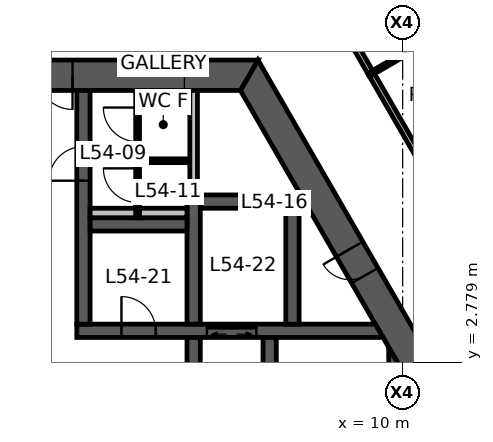
"""IFC4 building model, lengths in metres.
Left out: names, types, materials, properties, quantities, classifications, styles, units other than length and angle.
Written with IfcOpenShell. Run it as: python <this file> out.ifc"""

import sys

from ifc_helpers import new_model, si_unit, direction, frame, frame_2d, origin, place, context, subcontext, project, spatial, polyline, rectangle, outline, extrude, element, fill, save


model = new_model("IFC4")
c1 = context("Model", 3, precision=1e-05, world=origin(), true_north=direction((0.0, 1.0)))
c2 = subcontext(c1, "Body", "Model", "MODEL_VIEW")
j1 = project(units=[si_unit("LENGTHUNIT", "METRE"), si_unit("PLANEANGLEUNIT", "RADIAN")], contexts=[c1])
p1 = place(None, origin())
s1 = spatial("IfcSite", under=j1, at=p1, CompositionType="ELEMENT")
p2 = place(p1, origin())
s2 = spatial("IfcBuilding", under=s1, at=p2, CompositionType="ELEMENT")
p3 = place(p2, frame((0.0, 0.0, 216.7)))
s3 = spatial("IfcBuildingStorey", under=s2, at=p3, CompositionType="ELEMENT", Elevation=216.7)
p4 = place(p3, frame((11.922, 0.0, 0.0), z_axis=(0.0, 0.0, 1.0), x_axis=(-0.500004296715, 0.866022923061, 0.0)))
e1 = element("IfcWall", 1, at=p4, inside=s3, PredefinedType="SHEAR", context=c2, shape_type="SweptSolid", body=[
    extrude(outline(polyline([(-0.231, -0.4), (5.835, -0.4), (6.635, -0.4), (12.153, -0.4), (11.691, 0.4), (6.635, 0.4), (5.835, 0.4), (0.231, 0.4), (-0.231, -0.4)])), origin(), (0.0, 0.0, 1.0), 3.9),
])
p5 = place(p4, frame((5.835, 0.0, 0.0)))
e2 = element("IfcOpeningElement", 2, at=p5, cuts=e1, PredefinedType="OPENING", context=c2, shape_type="SweptSolid", body=[
    extrude(rectangle(XDim=0.8, YDim=2.1, at=frame_2d((0.4, 1.05))), frame((0.0, 0.41, 0.0), z_axis=(0.0, -1.0, 0.0), x_axis=(1.0, 0.0, 0.0)), (0.0, 0.0, 1.0), 0.82),
])
p6 = place(p3, frame((5.961, 10.325, 0.0), z_axis=(0.0, 0.0, 1.0), x_axis=(-1.0, 0.0, 0.0)))
e3 = element("IfcWall", 3, at=p6, inside=s3, PredefinedType="SHEAR", context=c2, shape_type="SweptSolid", body=[
    extrude(outline(polyline([(-0.231, -0.4), (4.649, -0.4), (5.549, -0.4), (6.374, -0.4), (7.273, -0.4), (12.153, -0.4), (11.691, 0.4), (7.273, 0.4), (6.374, 0.4), (5.549, 0.4), (4.649, 0.4), (0.231, 0.4), (-0.231, -0.4)])), origin(), (0.0, 0.0, 1.0), 3.9),
])
p7 = place(p6, frame((6.374, 0.0, 0.0)))
e4 = element("IfcOpeningElement", 4, at=p7, cuts=e3, PredefinedType="OPENING", context=c2, shape_type="SweptSolid", body=[
    extrude(rectangle(XDim=0.9, YDim=2.1, at=frame_2d((0.45, 1.05))), frame((0.0, 0.41, 0.0), z_axis=(0.0, -1.0, 0.0), x_axis=(1.0, 0.0, 0.0)), (0.0, 0.0, 1.0), 0.82),
])
p8 = place(p6, frame((4.649, 0.0, 0.0)))
e5 = element("IfcOpeningElement", 5, at=p8, cuts=e3, PredefinedType="OPENING", context=c2, shape_type="SweptSolid", body=[
    extrude(rectangle(XDim=0.9, YDim=2.1, at=frame_2d((0.45, 1.05))), frame((0.0, 0.41, 0.0), z_axis=(0.0, -1.0, 0.0), x_axis=(1.0, 0.0, 0.0)), (0.0, 0.0, 1.0), 0.82),
])
p9 = place(p3, frame((1.425, 3.6, 0.0), z_axis=(0.0, 0.0, 1.0), x_axis=(1.0, 0.0, 0.0)))
e6 = element("IfcWall", 6, at=p9, inside=s3, PredefinedType="SHEAR", context=c2, shape_type="SweptSolid", body=[
    extrude(outline(polyline([(0.0, -0.175), (1.175, -0.175), (2.075, -0.175), (3.425, -0.175), (4.725, -0.175), (8.058, -0.175), (7.856, 0.175), (4.725, 0.175), (3.425, 0.175), (2.075, 0.175), (1.175, 0.175), (0.0, 0.175), (0.0, -0.175)])), origin(), (0.0, 0.0, 1.0), 3.9),
])
p10 = place(p9, frame((1.175, 0.0, 0.0)))
e7 = element("IfcOpeningElement", 7, at=p10, cuts=e6, PredefinedType="OPENING", context=c2, shape_type="SweptSolid", body=[
    extrude(rectangle(XDim=0.9, YDim=2.1, at=frame_2d((0.45, 1.05))), frame((0.0, 0.185, 0.0), z_axis=(0.0, -1.0, 0.0), x_axis=(1.0, 0.0, 0.0)), (0.0, 0.0, 1.0), 0.37),
])
p11 = place(p9, frame((3.425, 0.0, 0.0)))
e8 = element("IfcOpeningElement", 8, at=p11, cuts=e6, PredefinedType="OPENING", context=c2, shape_type="SweptSolid", body=[
    extrude(rectangle(XDim=1.3, YDim=2.1, at=frame_2d((0.65, 1.05))), frame((0.0, 0.185, 0.0), z_axis=(0.0, -1.0, 0.0), x_axis=(1.0, 0.0, 0.0)), (0.0, 0.0, 1.0), 0.37),
])
p12 = place(p3, frame((1.6, 3.775, 0.0), z_axis=(0.0, 0.0, 1.0), x_axis=(0.0, 1.0, 0.0)))
e9 = element("IfcWall", 9, at=p12, inside=s3, PredefinedType="SHEAR", context=c2, shape_type="SweptSolid", body=[
    extrude(rectangle(XDim=6.15, YDim=0.35, at=frame_2d((3.075, 0.0))), origin(), (0.0, 0.0, 1.0), 3.9),
])
p13 = place(p12, frame((3.775, 0.0, 0.0)))
e10 = element("IfcOpeningElement", 10, at=p13, cuts=e9, PredefinedType="OPENING", context=c2, shape_type="SweptSolid", body=[
    extrude(rectangle(XDim=0.9, YDim=2.1, at=frame_2d((0.45, 1.05))), frame((0.0, 0.185, 0.0), z_axis=(0.0, -1.0, 0.0), x_axis=(1.0, 0.0, 0.0)), (0.0, 0.0, 1.0), 0.37),
])
p14 = place(p3, frame((4.5, -3.425, 0.0), z_axis=(0.0, 0.0, 1.0), x_axis=(0.0, 1.0, 0.0)))
e11 = element("IfcWall", 11, at=p14, inside=s3, PredefinedType="SHEAR", context=c2, shape_type="SweptSolid", body=[
    extrude(rectangle(XDim=6.85, YDim=0.35, at=frame_2d((3.425, 0.0))), origin(), (0.0, 0.0, 1.0), 3.9),
])
p15 = place(p14, frame((2.925, 0.0, 0.0)))
e12 = element("IfcOpeningElement", 12, at=p15, cuts=e11, PredefinedType="OPENING", context=c2, shape_type="SweptSolid", body=[
    extrude(rectangle(XDim=1.0, YDim=2.1, at=frame_2d((0.5, 1.05))), frame((0.0, 0.185, 0.0), z_axis=(0.0, -1.0, 0.0), x_axis=(1.0, 0.0, 0.0)), (0.0, 0.0, 1.0), 0.37),
])
p16 = place(p3, frame((6.5, -3.425, 0.0), z_axis=(0.0, 0.0, 1.0), x_axis=(0.0, 1.0, 0.0)))
e13 = element("IfcWall", 13, at=p16, inside=s3, PredefinedType="SHEAR", context=c2, shape_type="SweptSolid", body=[
    extrude(rectangle(XDim=6.85, YDim=0.35, at=frame_2d((3.425, 0.0))), origin(), (0.0, 0.0, 1.0), 3.9),
])
p17 = place(p16, frame((0.1, 0.0, 0.0)))
e14 = element("IfcOpeningElement", 14, at=p17, cuts=e13, PredefinedType="OPENING", context=c2, shape_type="SweptSolid", body=[
    extrude(rectangle(XDim=1.0, YDim=2.1, at=frame_2d((0.5, 1.05))), frame((0.0, 0.185, 0.0), z_axis=(0.0, -1.0, 0.0), x_axis=(1.0, 0.0, 0.0)), (0.0, 0.0, 1.0), 0.37),
])
p18 = place(p3, frame((4.5, 3.775, 0.0), z_axis=(0.0, 0.0, 1.0), x_axis=(0.0, 1.0, 0.0)))
e15 = element("IfcWall", 15, at=p18, inside=s3, PredefinedType="SHEAR", context=c2, shape_type="SweptSolid", body=[
    extrude(rectangle(XDim=3.4, YDim=0.35, at=frame_2d((1.7, 0.0))), origin(), (0.0, 0.0, 1.0), 3.9),
])
p19 = place(p3, frame((1.775, 6.4, 0.0), z_axis=(0.0, 0.0, 1.0), x_axis=(1.0, 0.0, 0.0)))
e16 = element("IfcWall", 16, at=p19, inside=s3, PredefinedType="SHEAR", context=c2, shape_type="SweptSolid", body=[
    extrude(rectangle(XDim=2.55, YDim=0.35, at=frame_2d((1.275, 0.0))), origin(), (0.0, 0.0, 1.0), 3.9),
])
p20 = place(p3, frame((4.675, 7.0, 0.0), z_axis=(0.0, 0.0, 1.0), x_axis=(1.0, 0.0, 0.0)))
e17 = element("IfcWall", 17, at=p20, inside=s3, PredefinedType="SHEAR", context=c2, shape_type="SweptSolid", body=[
    extrude(rectangle(XDim=2.6, YDim=0.35, at=frame_2d((1.3, 0.0))), origin(), (0.0, 0.0, 1.0), 3.9),
])
p21 = place(p3, frame((7.1, 3.775, 0.0), z_axis=(0.0, 0.0, 1.0), x_axis=(0.0, 1.0, 0.0)))
e18 = element("IfcWall", 18, at=p21, inside=s3, PredefinedType="SHEAR", context=c2, shape_type="SweptSolid", body=[
    extrude(rectangle(XDim=3.05, YDim=0.35, at=frame_2d((1.525, 0.0))), origin(), (0.0, 0.0, 1.0), 3.9),
])
p22 = place(p3, frame((9.808, -2.862, 0.0), z_axis=(0.0, 0.0, 1.0), x_axis=(0.0, 1.0, 0.0)))
e19 = element("IfcWall", 19, at=p22, inside=s3, PredefinedType="SHEAR", context=c2, shape_type="SweptSolid", body=[
    extrude(outline(polyline([(0.303, -0.175), (5.421, -0.175), (6.028, 0.175), (-0.303, 0.175), (0.303, -0.175)])), origin(), (0.0, 0.0, 1.0), 3.9),
])
p23 = place(p3, frame((4.5, 7.175, 0.0), z_axis=(0.0, 0.0, 1.0), x_axis=(0.0, 1.0, 0.0)))
e20 = element("IfcWall", 20, at=p23, inside=s3, PredefinedType="STANDARD", context=c2, shape_type="SweptSolid", body=[
    extrude(rectangle(XDim=2.75, YDim=0.2, at=frame_2d((1.375, 0.0))), origin(), (0.0, 0.0, 1.0), 3.9),
])
p24 = place(p3, frame((1.775, 6.7, 0.0), z_axis=(0.0, 0.0, 1.0), x_axis=(1.0, 0.0, 0.0)))
e21 = element("IfcWall", 21, at=p24, inside=s3, PredefinedType="PLUMBINGWALL", context=c2, shape_type="SweptSolid", body=[
    extrude(rectangle(XDim=2.55, YDim=0.25, at=frame_2d((1.275, 0.0))), origin(), (0.0, 0.0, 1.0), 3.9),
])
p25 = place(p3, frame((3.025, 6.575, 0.0), z_axis=(0.0, 0.0, 1.0), x_axis=(0.0, 1.0, 0.0)))
e22 = element("IfcWall", 22, at=p25, inside=s3, PredefinedType="PARTITIONING", context=c2, shape_type="SweptSolid", body=[
    extrude(rectangle(XDim=3.35, YDim=0.1, at=frame_2d((1.675, 0.0))), origin(), (0.0, 0.0, 1.0), 2.95),
])
p26 = place(p25, frame((2.0, 0.0, 0.0)))
e23 = element("IfcOpeningElement", 23, at=p26, cuts=e22, PredefinedType="OPENING", context=c2, shape_type="SweptSolid", body=[
    extrude(rectangle(XDim=0.9, YDim=2.1, at=frame_2d((0.45, 1.05))), frame((0.0, 0.06, 0.0), z_axis=(0.0, -1.0, 0.0), x_axis=(1.0, 0.0, 0.0)), (0.0, 0.0, 1.0), 0.12),
])
p27 = place(p25, frame((0.4, 0.0, 0.0)))
e24 = element("IfcOpeningElement", 24, at=p27, cuts=e22, PredefinedType="OPENING", context=c2, shape_type="SweptSolid", body=[
    extrude(rectangle(XDim=0.9, YDim=2.1, at=frame_2d((0.45, 1.05))), frame((0.0, 0.06, 0.0), z_axis=(0.0, -1.0, 0.0), x_axis=(1.0, 0.0, 0.0)), (0.0, 0.0, 1.0), 0.12),
])
p28 = place(p3, frame((3.075, 8.075, 0.0), z_axis=(0.0, 0.0, 1.0), x_axis=(1.0, 0.0, 0.0)))
e25 = element("IfcWall", 25, at=p28, inside=s3, PredefinedType="PARTITIONING", context=c2, shape_type="SweptSolid", body=[
    extrude(rectangle(XDim=1.25, YDim=0.1, at=frame_2d((0.625, 0.0))), origin(), (0.0, 0.0, 1.0), 2.95),
])
p29 = place(p3, frame((9.164, 10.377, 0.0), z_axis=(0.0, 0.0, 1.0), x_axis=(0.500038395149, -0.8660032352, 0.0)))
e26 = element("IfcWall", 26, at=p29, inside=s3, PredefinedType="PARTITIONING", context=c2, shape_type="SweptSolid", body=[
    extrude(rectangle(XDim=3.01, YDim=0.15, at=frame_2d((1.505, 0.0))), origin(), (0.0, 0.0, 1.0), 2.95),
])
p30 = place(p3, frame((7.578, 13.125, 0.0), z_axis=(0.0, 0.0, 1.0), x_axis=(0.499992528944, -0.866029717158, 0.0)))
e27 = element("IfcWall", 27, at=p30, inside=s3, PredefinedType="PARTITIONING", context=c2, shape_type="SweptSolid", body=[
    extrude(rectangle(XDim=3.182, YDim=0.15, at=frame_2d((1.591, 0.0))), origin(), (0.0, 0.0, 1.0), 2.95),
])
p31 = place(p3, frame((9.169, 10.369, 0.0), z_axis=(0.0, 0.0, 1.0), x_axis=(0.865255114713, 0.501331812737, 0.0)))
e28 = element("IfcWall", 28, at=p31, inside=s3, PredefinedType="PARTITIONING", context=c2, shape_type="SweptSolid", body=[
    extrude(rectangle(XDim=2.8, YDim=0.1, at=frame_2d((1.4, 0.0))), origin(), (0.0, 0.0, 1.0), 2.95),
])
p32 = place(p8, origin())
e29 = element("IfcDoor", 29, at=p32, inside=s3, OperationType="SINGLE_SWING_LEFT", PredefinedType="DOOR", context=c2, shape_type="SweptSolid", body=[
    extrude(rectangle(XDim=0.9, YDim=2.1, at=frame_2d((0.45, 1.05))), frame((0.0, 0.025, 0.0), z_axis=(0.0, -1.0, 0.0), x_axis=(1.0, 0.0, 0.0)), (0.0, 0.0, 1.0), 0.05),
])
fill(e5, e29)
p33 = place(p5, origin())
e30 = element("IfcDoor", 30, at=p33, inside=s3, OperationType="SINGLE_SWING_RIGHT", PredefinedType="DOOR", context=c2, shape_type="SweptSolid", body=[
    extrude(rectangle(XDim=0.8, YDim=2.1, at=frame_2d((0.4, 1.05))), frame((0.0, 0.025, 0.0), z_axis=(0.0, -1.0, 0.0), x_axis=(1.0, 0.0, 0.0)), (0.0, 0.0, 1.0), 0.05),
])
fill(e2, e30)
p34 = place(p13, origin())
e31 = element("IfcDoor", 31, at=p34, inside=s3, OperationType="SINGLE_SWING_LEFT", PredefinedType="DOOR", context=c2, shape_type="SweptSolid", body=[
    extrude(rectangle(XDim=0.9, YDim=2.1, at=frame_2d((0.45, 1.05))), frame((0.0, 0.025, 0.0), z_axis=(0.0, -1.0, 0.0), x_axis=(1.0, 0.0, 0.0)), (0.0, 0.0, 1.0), 0.05),
])
fill(e10, e31)
p35 = place(p10, origin())
e32 = element("IfcDoor", 32, at=p35, inside=s3, OperationType="SINGLE_SWING_LEFT", PredefinedType="DOOR", context=c2, shape_type="SweptSolid", body=[
    extrude(rectangle(XDim=0.9, YDim=2.1, at=frame_2d((0.45, 1.05))), frame((0.0, 0.025, 0.0), z_axis=(0.0, -1.0, 0.0), x_axis=(1.0, 0.0, 0.0)), (0.0, 0.0, 1.0), 0.05),
])
fill(e7, e32)
p36 = place(p26, origin())
e33 = element("IfcDoor", 33, at=p36, inside=s3, OperationType="SINGLE_SWING_RIGHT", PredefinedType="DOOR", context=c2, shape_type="SweptSolid", body=[
    extrude(rectangle(XDim=0.9, YDim=2.1, at=frame_2d((0.45, 1.05))), frame((0.0, 0.025, 0.0), z_axis=(0.0, -1.0, 0.0), x_axis=(1.0, 0.0, 0.0)), (0.0, 0.0, 1.0), 0.05),
])
fill(e23, e33)
p37 = place(p27, origin())
e34 = element("IfcDoor", 34, at=p37, inside=s3, OperationType="SINGLE_SWING_RIGHT", PredefinedType="DOOR", context=c2, shape_type="SweptSolid", body=[
    extrude(rectangle(XDim=0.9, YDim=2.1, at=frame_2d((0.45, 1.05))), frame((0.0, 0.025, 0.0), z_axis=(0.0, -1.0, 0.0), x_axis=(1.0, 0.0, 0.0)), (0.0, 0.0, 1.0), 0.05),
])
fill(e24, e34)
p38 = place(p11, origin())
e35 = element("IfcDoor", 35, at=p38, inside=s3, OperationType="DOUBLE_DOOR_SLIDING", PredefinedType="DOOR", context=c2, shape_type="SweptSolid", body=[
    extrude(rectangle(XDim=1.3, YDim=2.1, at=frame_2d((0.65, 1.05))), frame((0.0, 0.025, 0.0), z_axis=(0.0, -1.0, 0.0), x_axis=(1.0, 0.0, 0.0)), (0.0, 0.0, 1.0), 0.05),
])
fill(e8, e35)
save(model, sys.argv[1])
